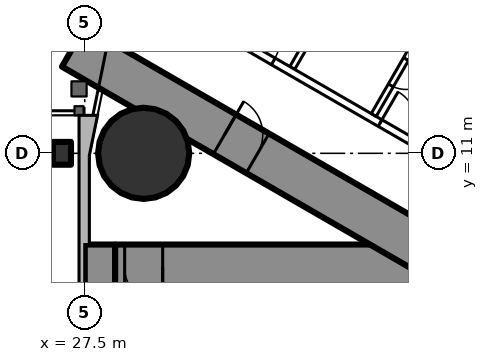
"""IFC4 building model, lengths in metres.
Left out: names, types, materials, properties, quantities, classifications, styles, units other than length and angle.
Written with IfcOpenShell. Run it as: python <this file> out.ifc"""

import sys

from ifc_helpers import new_model, si_unit, direction, frame, frame_2d, origin, origin_2d, place, context, subcontext, project, spatial, rectangle, circle, i_section, extrude, element, fill, save


model = new_model("IFC4")
c1 = context("Model", 3, precision=1e-05, world=origin(), true_north=direction((0.0, 1.0)))
c2 = subcontext(c1, "Body", "Model", "MODEL_VIEW")
j1 = project(units=[si_unit("LENGTHUNIT", "METRE"), si_unit("PLANEANGLEUNIT", "RADIAN")], contexts=[c1])
p1 = place(None, origin())
s1 = spatial("IfcSite", under=j1, at=p1, CompositionType="ELEMENT")
p2 = place(p1, origin())
s2 = spatial("IfcBuilding", under=s1, at=p2, CompositionType="ELEMENT")
p3 = place(p2, frame((0.0, 0.0, 222.5)))
s3 = spatial("IfcBuildingStorey", under=s2, at=p3, CompositionType="ELEMENT", Elevation=222.5)
p4 = place(p3, frame((29.05, 11.0, 0.0), z_axis=(0.0, 0.0, 1.0), x_axis=(1.0, 0.0, 0.0)))
e1 = element("IfcColumn", 1, at=p4, inside=s3, PredefinedType="COLUMN", context=c2, shape_type="SweptSolid", body=[
    extrude(circle(Radius=1.2, at=origin_2d()), origin(), (0.0, 0.0, 1.0), 3.6),
])
p5 = place(p3, frame((27.9, -8.6, 0.0), z_axis=(0.0, 0.0, 1.0), x_axis=(0.0, 1.0, 0.0)))
e2 = element("IfcWall", 2, at=p5, inside=s3, PredefinedType="SHEAR", context=c2, shape_type="SweptSolid", body=[
    extrude(rectangle(XDim=17.2, YDim=0.8, at=frame_2d((8.6, 0.0))), origin(), (0.0, 0.0, 1.0), 3.6),
])
p6 = place(p5, frame((9.35, 0.0, 0.0)))
e3 = element("IfcOpeningElement", 3, at=p6, cuts=e2, PredefinedType="OPENING", context=c2, shape_type="SweptSolid", body=[
    extrude(rectangle(XDim=0.9, YDim=2.2, at=frame_2d((0.45, 1.1))), frame((0.0, 0.41, 0.0), z_axis=(0.0, -1.0, 0.0), x_axis=(1.0, 0.0, 0.0)), (0.0, 0.0, 1.0), 0.82),
])
p7 = place(p3, frame((28.3, 8.0, 0.0), z_axis=(0.0, 0.0, 1.0), x_axis=(1.0, 0.0, 0.0)))
e4 = element("IfcWall", 4, at=p7, inside=s3, PredefinedType="SHEAR", context=c2, shape_type="SweptSolid", body=[
    extrude(rectangle(XDim=8.4, YDim=1.2, at=frame_2d((4.2, 0.0))), origin(), (0.0, 0.0, 1.0), 3.6),
])
p8 = place(p7, frame((0.25, 0.0, 0.0)))
e5 = element("IfcOpeningElement", 5, at=p8, cuts=e4, PredefinedType="OPENING", context=c2, shape_type="SweptSolid", body=[
    extrude(rectangle(XDim=1.0, YDim=2.2, at=frame_2d((0.5, 1.1))), frame((0.0, 0.61, 0.0), z_axis=(0.0, -1.0, 0.0), x_axis=(1.0, 0.0, 0.0)), (0.0, 0.0, 1.0), 1.22),
])
p9 = place(p3, frame((27.2, 13.8, 0.0), z_axis=(0.0, 0.0, 1.0), x_axis=(0.866024515034, -0.500001539357, 0.0)))
e6 = element("IfcWall", 6, at=p9, inside=s3, PredefinedType="SHEAR", context=c2, shape_type="SweptSolid", body=[
    extrude(rectangle(XDim=26.907, YDim=1.2, at=frame_2d((13.454, 0.0))), origin(), (0.0, 0.0, 1.0), 3.6),
])
p10 = place(p9, frame((4.6, 0.0, 0.0)))
e7 = element("IfcOpeningElement", 7, at=p10, cuts=e6, PredefinedType="OPENING", context=c2, shape_type="SweptSolid", body=[
    extrude(rectangle(XDim=1.0, YDim=2.2, at=frame_2d((0.5, 1.1))), frame((0.0, 0.61, 0.0), z_axis=(0.0, -1.0, 0.0), x_axis=(1.0, 0.0, 0.0)), (0.0, 0.0, 1.0), 1.22),
])
p11 = place(p9, frame((13.395, 0.0, 0.0)))
e8 = element("IfcOpeningElement", 8, at=p11, cuts=e6, PredefinedType="OPENING", context=c2, shape_type="SweptSolid", body=[
    extrude(rectangle(XDim=1.8, YDim=2.2, at=frame_2d((0.9, 1.1))), frame((0.0, 0.61, 0.0), z_axis=(0.0, -1.0, 0.0), x_axis=(1.0, 0.0, 0.0)), (0.0, 0.0, 1.0), 1.22),
])
p12 = place(p3, frame((26.9, 11.0, 0.0), z_axis=(0.0, 0.0, 1.0), x_axis=(1.0, 0.0, 0.0)))
e9 = element("IfcColumn", 9, at=p12, inside=s3, PredefinedType="COLUMN", context=c2, shape_type="SweptSolid", body=[
    extrude(i_section(OverallWidth=0.476, OverallDepth=0.6, WebThickness=0.1, FlangeThickness=0.14, FilletRadius=0.02, at=origin_2d()), origin(), (0.0, 0.0, 1.0), 3.6),
])
p13 = place(p3, frame((32.96, 13.246, 0.0), z_axis=(0.0, 0.0, 1.0), x_axis=(0.500000236886, 0.866025267018, 0.0)))
e10 = element("IfcWall", 10, at=p13, inside=s3, PredefinedType="PARTITIONING", context=c2, shape_type="SweptSolid", body=[
    extrude(rectangle(XDim=7.583, YDim=0.15, at=frame_2d((3.791, 0.0))), origin(), (0.0, 0.0, 1.0), 3.35),
])
p14 = place(p3, frame((28.959, 15.44, 0.0), z_axis=(0.0, 0.0, 1.0), x_axis=(0.866028936079, -0.499993881836, 0.0)))
e11 = element("IfcWall", 11, at=p14, inside=s3, PredefinedType="PARTITIONING", context=c2, shape_type="SweptSolid", body=[
    extrude(rectangle(XDim=20.503, YDim=0.2, at=frame_2d((10.251, 0.0))), origin(), (0.0, 0.0, 1.0), 3.35),
])
p15 = place(p14, frame((16.603, 0.0, 0.0)))
e12 = element("IfcOpeningElement", 12, at=p15, cuts=e11, PredefinedType="OPENING", context=c2, shape_type="SweptSolid", body=[
    extrude(rectangle(XDim=0.95, YDim=2.2, at=frame_2d((0.475, 1.1))), frame((0.0, 0.11, 0.0), z_axis=(0.0, -1.0, 0.0), x_axis=(1.0, 0.0, 0.0)), (0.0, 0.0, 1.0), 0.22),
])
p16 = place(p14, frame((7.287, 0.0, 0.0)))
e13 = element("IfcOpeningElement", 13, at=p16, cuts=e11, PredefinedType="OPENING", context=c2, shape_type="SweptSolid", body=[
    extrude(rectangle(XDim=0.95, YDim=2.2, at=frame_2d((0.475, 1.1))), frame((0.0, 0.11, 0.0), z_axis=(0.0, -1.0, 0.0), x_axis=(1.0, 0.0, 0.0)), (0.0, 0.0, 1.0), 0.22),
])
p17 = place(p14, frame((2.244, 0.0, 0.0)))
e14 = element("IfcOpeningElement", 14, at=p17, cuts=e11, PredefinedType="OPENING", context=c2, shape_type="SweptSolid", body=[
    extrude(rectangle(XDim=1.8, YDim=2.03, at=frame_2d((0.9, 1.015))), frame((0.0, 0.11, 0.0), z_axis=(0.0, -1.0, 0.0), x_axis=(1.0, 0.0, 0.0)), (0.0, 0.0, 1.0), 0.22),
])
p18 = place(p3, frame((35.104, 12.008, 0.0), z_axis=(0.0, 0.0, 1.0), x_axis=(0.500047596559, 0.865997922154, 0.0)))
e15 = element("IfcWall", 15, at=p18, inside=s3, PredefinedType="PARTITIONING", context=c2, shape_type="SweptSolid", body=[
    extrude(rectangle(XDim=2.6, YDim=0.15, at=frame_2d((1.3, 0.0))), origin(), (0.0, 0.0, 1.0), 3.35),
])
p19 = place(p18, frame((0.9, 0.0, 0.0)))
e16 = element("IfcOpeningElement", 16, at=p19, cuts=e15, PredefinedType="OPENING", context=c2, shape_type="SweptSolid", body=[
    extrude(rectangle(XDim=0.8, YDim=2.2, at=frame_2d((0.4, 1.1))), frame((0.0, 0.085, 0.0), z_axis=(0.0, -1.0, 0.0), x_axis=(1.0, 0.0, 0.0)), (0.0, 0.0, 1.0), 0.17),
])
p20 = place(p19, origin())
e17 = element("IfcDoor", 17, at=p20, inside=s3, OperationType="SINGLE_SWING_RIGHT", PredefinedType="DOOR", context=c2, shape_type="SweptSolid", body=[
    extrude(rectangle(XDim=0.8, YDim=2.2, at=frame_2d((0.4, 1.1))), frame((0.0, 0.025, 0.0), z_axis=(0.0, -1.0, 0.0), x_axis=(1.0, 0.0, 0.0)), (0.0, 0.0, 1.0), 0.05),
])
fill(e16, e17)
p21 = place(p16, origin())
e18 = element("IfcDoor", 18, at=p21, inside=s3, OperationType="SINGLE_SWING_LEFT", PredefinedType="DOOR", context=c2, shape_type="SweptSolid", body=[
    extrude(rectangle(XDim=0.95, YDim=2.2, at=frame_2d((0.475, 1.1))), frame((0.0, 0.025, 0.0), z_axis=(0.0, -1.0, 0.0), x_axis=(1.0, 0.0, 0.0)), (0.0, 0.0, 1.0), 0.05),
])
fill(e13, e18)
p22 = place(p17, origin())
e19 = element("IfcDoor", 19, at=p22, inside=s3, OperationType="DOUBLE_DOOR_SINGLE_SWING", PredefinedType="DOOR", context=c2, shape_type="SweptSolid", body=[
    extrude(rectangle(XDim=1.8, YDim=2.03, at=frame_2d((0.9, 1.015))), frame((0.0, 0.025, 0.0), z_axis=(0.0, -1.0, 0.0), x_axis=(1.0, 0.0, 0.0)), (0.0, 0.0, 1.0), 0.05),
])
fill(e14, e19)
p23 = place(p10, origin())
e20 = element("IfcDoor", 20, at=p23, inside=s3, OperationType="SINGLE_SWING_LEFT", PredefinedType="DOOR", context=c2, shape_type="SweptSolid", body=[
    extrude(rectangle(XDim=1.0, YDim=2.2, at=frame_2d((0.5, 1.1))), frame((0.0, 0.025, 0.0), z_axis=(0.0, -1.0, 0.0), x_axis=(1.0, 0.0, 0.0)), (0.0, 0.0, 1.0), 0.05),
])
fill(e7, e20)
p24 = place(p8, origin())
e21 = element("IfcDoor", 21, at=p24, inside=s3, OperationType="SINGLE_SWING_RIGHT", PredefinedType="DOOR", context=c2, shape_type="SweptSolid", body=[
    extrude(rectangle(XDim=1.0, YDim=2.2, at=frame_2d((0.5, 1.1))), frame((0.0, 0.025, 0.0), z_axis=(0.0, -1.0, 0.0), x_axis=(1.0, 0.0, 0.0)), (0.0, 0.0, 1.0), 0.05),
])
fill(e5, e21)
save(model, sys.argv[1])
